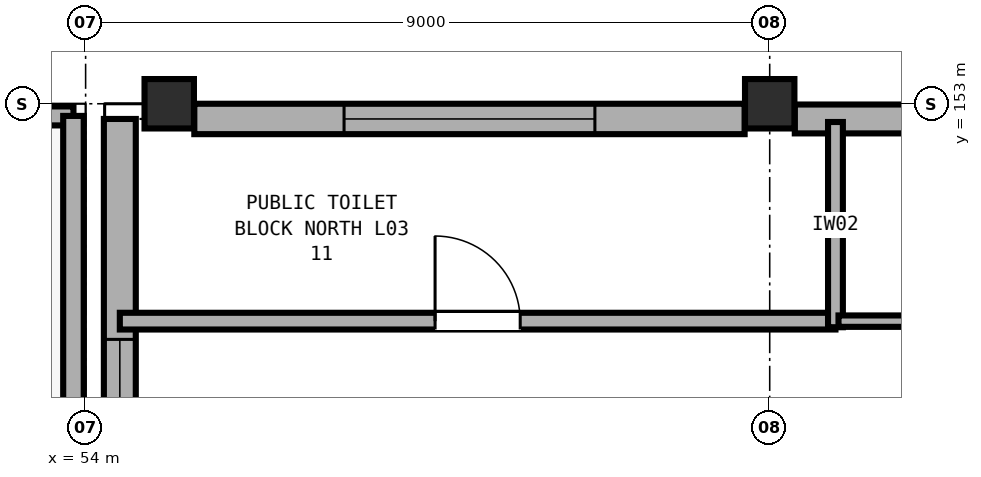
"""IFC4 building model, lengths in metres.
Left out: names, types, materials, properties, quantities, classifications, styles, units other than length and angle.
Written with IfcOpenShell. Run it as: python <this file> out.ifc"""

import sys

from ifc_helpers import new_model, si_unit, direction, frame, frame_2d, origin, origin_2d, place, context, subcontext, project, spatial, rectangle, extrude, element, fill, save


model = new_model("IFC4")
c1 = context("Model", 3, precision=1e-05, world=origin(), true_north=direction((0.0, 1.0)))
c2 = subcontext(c1, "Body", "Model", "MODEL_VIEW")
j1 = project(units=[si_unit("LENGTHUNIT", "METRE"), si_unit("PLANEANGLEUNIT", "RADIAN")], contexts=[c1])
p1 = place(None, origin())
s1 = spatial("IfcSite", under=j1, at=p1, CompositionType="ELEMENT")
p2 = place(p1, origin())
s2 = spatial("IfcBuilding", under=s1, at=p2, CompositionType="ELEMENT")
p3 = place(p2, frame((0.0, 0.0, 14.4)))
s3 = spatial("IfcBuildingStorey", under=s2, at=p3, CompositionType="ELEMENT", Elevation=14.4)
for number, where, z_axis, x_axis in (
    (1, (55.1, 153.0, 0.0), (0.0, 0.0, 1.0), (1.0, 0.0, 0.0)),
    (2, (63.0, 153.0, 0.0), (0.0, 0.0, 1.0), (1.0, 0.0, 0.0)),
):
    element("IfcColumn", number, at=place(p3, frame(where, z_axis=z_axis, x_axis=x_axis)), inside=s3, PredefinedType="COLUMN", context=c2, shape_type="SweptSolid", body=[
        extrude(rectangle(XDim=0.65, YDim=0.65, at=origin_2d()), origin(), (0.0, 0.0, 1.0), 4.8),
    ])
p4 = place(p3, frame((54.45, 144.0, 0.0), z_axis=(0.0, 0.0, 1.0), x_axis=(0.0, 1.0, 0.0)))
e3 = element("IfcWall", 3, at=p4, inside=s3, PredefinedType="SOLIDWALL", context=c2, shape_type="SweptSolid", body=[
    extrude(rectangle(XDim=8.8, YDim=0.42, at=frame_2d((4.4, 0.0))), origin(), (0.0, 0.0, 1.0), 3.58),
])
p5 = place(p4, frame((3.1, 0.0, 0.9)))
e4 = element("IfcOpeningElement", 4, at=p5, cuts=e3, PredefinedType="OPENING", context=c2, shape_type="SweptSolid", body=[
    extrude(rectangle(XDim=2.8, YDim=2.2, at=frame_2d((1.4, 1.1))), frame((0.0, 0.22, 0.0), z_axis=(0.0, -1.0, 0.0), x_axis=(1.0, 0.0, 0.0)), (0.0, 0.0, 1.0), 0.44),
])
p6 = place(p3, frame((55.43, 152.8, 0.0), z_axis=(0.0, 0.0, 1.0), x_axis=(1.0, 0.0, 0.0)))
e5 = element("IfcWall", 5, at=p6, inside=s3, PredefinedType="SOLIDWALL", context=c2, shape_type="SweptSolid", body=[
    extrude(rectangle(XDim=7.24, YDim=0.4, at=frame_2d((3.62, 0.0))), origin(), (0.0, 0.0, 1.0), 3.58),
])
p7 = place(p6, frame((1.97, 0.0, 0.9)))
e6 = element("IfcOpeningElement", 6, at=p7, cuts=e5, PredefinedType="OPENING", context=c2, shape_type="SweptSolid", body=[
    extrude(rectangle(XDim=3.3, YDim=2.0, at=frame_2d((1.65, 1.0))), frame((0.0, 0.21, 0.0), z_axis=(0.0, -1.0, 0.0), x_axis=(1.0, 0.0, 0.0)), (0.0, 0.0, 1.0), 0.42),
])
p8 = place(p3, frame((63.33, 152.8, 0.0), z_axis=(0.0, 0.0, 1.0), x_axis=(1.0, 0.0, 0.0)))
e7 = element("IfcWall", 7, at=p8, inside=s3, PredefinedType="SOLIDWALL", context=c2, shape_type="SweptSolid", body=[
    extrude(rectangle(XDim=8.34, YDim=0.38, at=frame_2d((4.17, 0.0))), origin(), (0.0, 0.0, 1.0), 3.58),
])
p9 = place(p8, frame((2.47, 0.0, 0.9)))
e8 = element("IfcOpeningElement", 8, at=p9, cuts=e7, PredefinedType="OPENING", context=c2, shape_type="SweptSolid", body=[
    extrude(rectangle(XDim=3.4, YDim=1.95, at=frame_2d((1.7, 0.975))), frame((0.0, 0.2, 0.0), z_axis=(0.0, -1.0, 0.0), x_axis=(1.0, 0.0, 0.0)), (0.0, 0.0, 1.0), 0.4),
])
p10 = place(p3, frame((36.66, 152.84, 0.0), z_axis=(0.0, 0.0, 1.0), x_axis=(1.0, 0.0, 0.0)))
e9 = element("IfcWall", 9, at=p10, inside=s3, PredefinedType="PARAPET", context=c2, shape_type="SweptSolid", body=[
    extrude(rectangle(XDim=17.18, YDim=0.25, at=frame_2d((8.59, 0.0))), origin(), (0.0, 0.0, 1.0), 0.65),
])
p11 = place(p3, frame((53.84, 152.84, 0.0), z_axis=(0.0, 0.0, 1.0), x_axis=(0.0, -1.0, 0.0)))
e10 = element("IfcWall", 10, at=p11, inside=s3, PredefinedType="PARAPET", context=c2, shape_type="SweptSolid", body=[
    extrude(rectangle(XDim=17.18, YDim=0.27, at=frame_2d((8.59, 0.0))), origin(), (0.0, 0.0, 1.0), 0.65),
])
p12 = place(p3, frame((54.45, 150.14, 0.0), z_axis=(0.0, 0.0, 1.0), x_axis=(1.0, 0.0, 0.0)))
e11 = element("IfcWall", 11, at=p12, inside=s3, PredefinedType="PARTITIONING", context=c2, shape_type="SweptSolid", body=[
    extrude(rectangle(XDim=9.415, YDim=0.22, at=frame_2d((4.708, 0.0))), origin(), (0.0, 0.0, 1.0), 3.56),
])
p13 = place(p12, frame((4.147, 0.0, 0.0)))
e12 = element("IfcOpeningElement", 12, at=p13, cuts=e11, PredefinedType="OPENING", context=c2, shape_type="SweptSolid", body=[
    extrude(rectangle(XDim=1.12, YDim=2.22, at=frame_2d((0.56, 1.11))), frame((0.0, 0.12, 0.0), z_axis=(0.0, -1.0, 0.0), x_axis=(1.0, 0.0, 0.0)), (0.0, 0.0, 1.0), 0.24),
])
p14 = place(p3, frame((63.865, 152.76, 0.0), z_axis=(0.0, 0.0, 1.0), x_axis=(0.0, -1.0, 0.0)))
e13 = element("IfcWall", 13, at=p14, inside=s3, PredefinedType="PARTITIONING", context=c2, shape_type="SweptSolid", body=[
    extrude(rectangle(XDim=2.7, YDim=0.195, at=frame_2d((1.35, 0.0))), origin(), (0.0, 0.0, 1.0), 3.56),
])
p15 = place(p3, frame((73.24, 150.14, 0.0), z_axis=(0.0, 0.0, 1.0), x_axis=(-1.0, 0.0, 0.0)))
e14 = element("IfcWall", 14, at=p15, inside=s3, PredefinedType="PARTITIONING", context=c2, shape_type="SweptSolid", body=[
    extrude(rectangle(XDim=9.335, YDim=0.15, at=frame_2d((4.667, 0.0))), origin(), (0.0, 0.0, 1.0), 3.56),
])
p16 = place(p5, origin())
e15 = element("IfcWindow", 15, at=p16, inside=s3, PartitioningType="DOUBLE_PANEL_VERTICAL", PredefinedType="WINDOW", context=c2, shape_type="SweptSolid", body=[
    extrude(rectangle(XDim=2.8, YDim=2.2, at=frame_2d((1.4, 1.1))), frame((0.0, 0.03, 0.0), z_axis=(0.0, -1.0, 0.0), x_axis=(1.0, 0.0, 0.0)), (0.0, 0.0, 1.0), 0.06),
])
fill(e4, e15)
p17 = place(p7, origin())
e16 = element("IfcWindow", 16, at=p17, inside=s3, PartitioningType="DOUBLE_PANEL_VERTICAL", PredefinedType="WINDOW", context=c2, shape_type="SweptSolid", body=[
    extrude(rectangle(XDim=3.3, YDim=2.0, at=frame_2d((1.65, 1.0))), frame((0.0, 0.03, 0.0), z_axis=(0.0, -1.0, 0.0), x_axis=(1.0, 0.0, 0.0)), (0.0, 0.0, 1.0), 0.06),
])
fill(e6, e16)
p18 = place(p13, origin())
e17 = element("IfcDoor", 17, at=p18, inside=s3, OperationType="SINGLE_SWING_LEFT", PredefinedType="DOOR", context=c2, shape_type="SweptSolid", body=[
    extrude(rectangle(XDim=1.12, YDim=2.22, at=frame_2d((0.56, 1.11))), frame((0.0, 0.025, 0.0), z_axis=(0.0, -1.0, 0.0), x_axis=(1.0, 0.0, 0.0)), (0.0, 0.0, 1.0), 0.05),
])
fill(e12, e17)
save(model, sys.argv[1])
